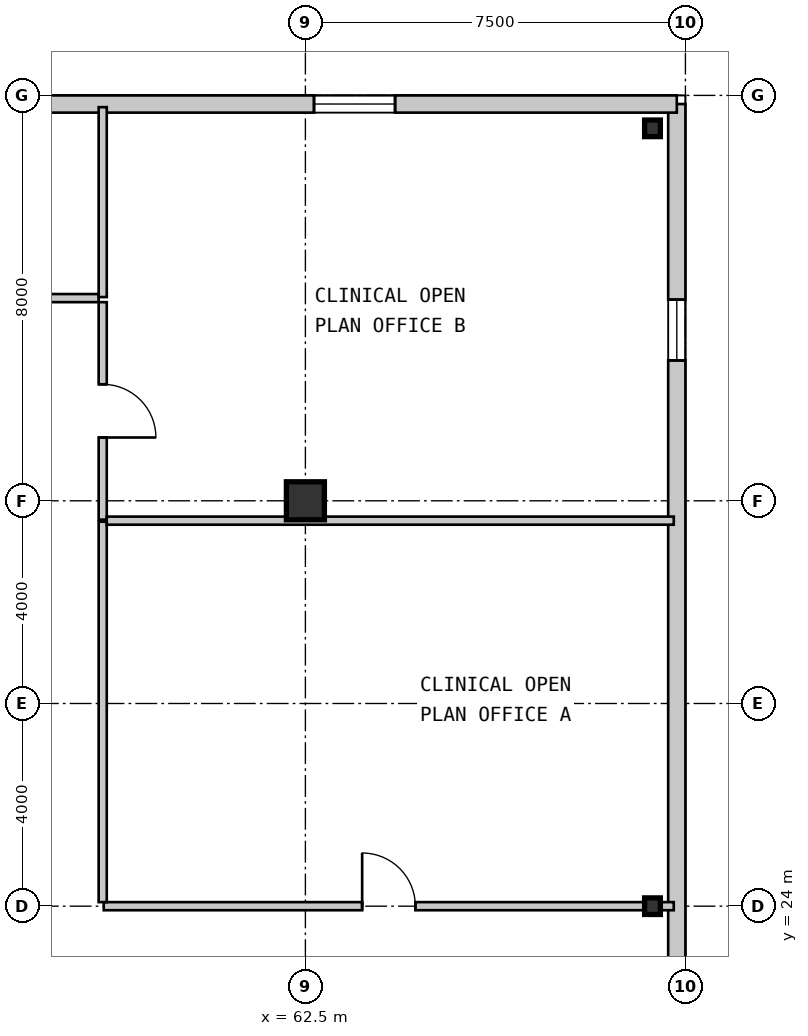
"""IFC4 building model, lengths in metres.
Left out: names, types, materials, properties, quantities, classifications, styles, units other than length and angle.
Written with IfcOpenShell. Run it as: python <this file> out.ifc"""

import sys

from ifc_helpers import new_model, si_unit, direction, frame, frame_2d, origin, origin_2d, place, context, subcontext, project, spatial, rectangle, circle, i_section, extrude, source, transform, mapped, element, fill, save


model = new_model("IFC4")
c1 = context("Model", 3, precision=1e-05, world=origin(), true_north=direction((0.0, 1.0)))
c2 = subcontext(c1, "Body", "Model", "MODEL_VIEW")
j1 = project(units=[si_unit("LENGTHUNIT", "METRE"), si_unit("PLANEANGLEUNIT", "RADIAN")], contexts=[c1])
p1 = place(None, origin())
s1 = spatial("IfcSite", under=j1, at=p1, CompositionType="ELEMENT")
p2 = place(p1, origin())
s2 = spatial("IfcBuilding", under=s1, at=p2, CompositionType="ELEMENT")
p3 = place(p2, frame((0.0, 0.0, 4.55)))
s3 = spatial("IfcBuildingStorey", under=s2, at=p3, CompositionType="ELEMENT", Elevation=4.55)
m1 = source(origin(), c2, "Body", "SweptSolid", [
    extrude(circle(Radius=0.375, at=origin_2d()), origin(), (0.0, 0.0, 1.0), 3.85),
])
p4 = place(p3, frame((62.5, 32.0, 0.0), z_axis=(0.0, 0.0, 1.0), x_axis=(1.0, 0.0, 0.0)))
e1 = element("IfcColumn", 1, at=p4, inside=s3, PredefinedType="COLUMN", context=c2, shape_type="MappedRepresentation", body=[
    mapped(m1, transform((0.0, 0.0, 0.0), scale=1.0)),
])
m2 = source(origin(), c2, "Body", "SweptSolid", [
    extrude(i_section(OverallWidth=0.311, OverallDepth=0.327, WebThickness=0.016, FlangeThickness=0.025, at=origin_2d()), origin(), (0.0, 0.0, 1.0), 3.85),
])
for number, where, z_axis, x_axis in (
    (2, (69.35, 24.0, 0.0), (0.0, 0.0, 1.0), (1.0, 0.0, 0.0)),
    (3, (69.35, 39.35, 0.0), (0.0, 0.0, 1.0), (1.0, 0.0, 0.0)),
):
    element("IfcColumn", number, at=place(p3, frame(where, z_axis=z_axis, x_axis=x_axis)), inside=s3, PredefinedType="COLUMN", context=c2, shape_type="MappedRepresentation", body=[
        mapped(m2, transform((0.0, 0.0, 0.0), scale=1.0)),
    ])
m3 = source(origin(), c2, "Body", "SweptSolid", [
    extrude(rectangle(XDim=39.66, YDim=0.34, at=frame_2d((19.83, 0.0))), origin(), (0.0, 0.0, 1.0), 3.59),
])
p5 = place(p3, frame((69.83, 0.17, 0.0), z_axis=(0.0, 0.0, 1.0), x_axis=(0.0, 1.0, 0.0)))
e4 = element("IfcWall", 4, at=p5, inside=s3, PredefinedType="SOLIDWALL", context=c2, shape_type="MappedRepresentation", body=[
    mapped(m3, transform((0.0, 0.0, 0.0), scale=1.0)),
])
m4 = source(origin(), c2, "Body", "SweptSolid", [
    extrude(rectangle(XDim=2.4, YDim=1.8, at=frame_2d((1.2, 0.9))), frame((0.0, 0.18, 0.0), z_axis=(0.0, -1.0, 0.0), x_axis=(1.0, 0.0, 0.0)), (0.0, 0.0, 1.0), 0.36),
])
p6 = place(p5, frame((3.2, 0.0, 0.95)))
e5 = element("IfcOpeningElement", 5, at=p6, cuts=e4, PredefinedType="OPENING", context=c2, shape_type="MappedRepresentation", body=[
    mapped(m4, transform((0.0, 0.0, 0.0), scale=1.0)),
])
m5 = source(origin(), c2, "Body", "SweptSolid", [
    extrude(rectangle(XDim=1.8, YDim=1.6, at=frame_2d((0.9, 0.8))), frame((0.0, 0.18, 0.0), z_axis=(0.0, -1.0, 0.0), x_axis=(1.0, 0.0, 0.0)), (0.0, 0.0, 1.0), 0.36),
])
p7 = place(p5, frame((7.8, 0.0, 0.95)))
e6 = element("IfcOpeningElement", 6, at=p7, cuts=e4, PredefinedType="OPENING", context=c2, shape_type="MappedRepresentation", body=[
    mapped(m5, transform((0.0, 0.0, 0.0), scale=1.0)),
])
m6 = source(origin(), c2, "Body", "SweptSolid", [
    extrude(rectangle(XDim=1.5, YDim=1.5, at=frame_2d((0.75, 0.75))), frame((0.0, 0.18, 0.0), z_axis=(0.0, -1.0, 0.0), x_axis=(1.0, 0.0, 0.0)), (0.0, 0.0, 1.0), 0.36),
])
p8 = place(p5, frame((21.2, 0.0, 0.95)))
e7 = element("IfcOpeningElement", 7, at=p8, cuts=e4, PredefinedType="OPENING", context=c2, shape_type="MappedRepresentation", body=[
    mapped(m6, transform((0.0, 0.0, 0.0), scale=1.0)),
])
m7 = source(origin(), c2, "Body", "SweptSolid", [
    extrude(rectangle(XDim=1.2, YDim=1.5, at=frame_2d((0.6, 0.75))), frame((0.0, 0.18, 0.0), z_axis=(0.0, -1.0, 0.0), x_axis=(1.0, 0.0, 0.0)), (0.0, 0.0, 1.0), 0.36),
])
p9 = place(p5, frame((34.6, 0.0, 0.95)))
e8 = element("IfcOpeningElement", 8, at=p9, cuts=e4, PredefinedType="OPENING", context=c2, shape_type="MappedRepresentation", body=[
    mapped(m7, transform((0.0, 0.0, 0.0), scale=1.0)),
])
m8 = source(origin(), c2, "Body", "SweptSolid", [
    extrude(rectangle(XDim=69.66, YDim=0.34, at=frame_2d((34.83, 0.0))), origin(), (0.0, 0.0, 1.0), 3.59),
])
p10 = place(p3, frame((0.17, 39.83, 0.0), z_axis=(0.0, 0.0, 1.0), x_axis=(1.0, 0.0, 0.0)))
e9 = element("IfcWall", 9, at=p10, inside=s3, PredefinedType="SOLIDWALL", context=c2, shape_type="MappedRepresentation", body=[
    mapped(m8, transform((0.0, 0.0, 0.0), scale=1.0)),
])
m9 = source(origin(), c2, "Body", "SweptSolid", [
    extrude(rectangle(XDim=1.6, YDim=1.2, at=frame_2d((0.8, 0.6))), frame((0.0, 0.18, 0.0), z_axis=(0.0, -1.0, 0.0), x_axis=(1.0, 0.0, 0.0)), (0.0, 0.0, 1.0), 0.36),
])
p11 = place(p10, frame((4.5, 0.0, 0.95)))
e10 = element("IfcOpeningElement", 10, at=p11, cuts=e9, PredefinedType="OPENING", context=c2, shape_type="MappedRepresentation", body=[
    mapped(m9, transform((0.0, 0.0, 0.0), scale=1.0)),
])
p12 = place(p10, frame((22.5, 0.0, 0.95)))
e11 = element("IfcOpeningElement", 11, at=p12, cuts=e9, PredefinedType="OPENING", context=c2, shape_type="MappedRepresentation", body=[
    mapped(m9, transform((0.0, 0.0, 0.0), scale=1.0)),
])
p13 = place(p10, frame((29.0, 0.0, 0.95)))
e12 = element("IfcOpeningElement", 12, at=p13, cuts=e9, PredefinedType="OPENING", context=c2, shape_type="MappedRepresentation", body=[
    mapped(m9, transform((0.0, 0.0, 0.0), scale=1.0)),
])
p14 = place(p10, frame((40.5, 0.0, 0.95)))
e13 = element("IfcOpeningElement", 13, at=p14, cuts=e9, PredefinedType="OPENING", context=c2, shape_type="MappedRepresentation", body=[
    mapped(m9, transform((0.0, 0.0, 0.0), scale=1.0)),
])
p15 = place(p10, frame((46.5, 0.0, 0.95)))
e14 = element("IfcOpeningElement", 14, at=p15, cuts=e9, PredefinedType="OPENING", context=c2, shape_type="MappedRepresentation", body=[
    mapped(m9, transform((0.0, 0.0, 0.0), scale=1.0)),
])
p16 = place(p10, frame((62.5, 0.0, 0.95)))
e15 = element("IfcOpeningElement", 15, at=p16, cuts=e9, PredefinedType="OPENING", context=c2, shape_type="MappedRepresentation", body=[
    mapped(m9, transform((0.0, 0.0, 0.0), scale=1.0)),
])
m10 = source(origin(), c2, "Body", "SweptSolid", [
    extrude(rectangle(XDim=11.25, YDim=0.16, at=frame_2d((5.625, 0.0))), origin(), (0.0, 0.0, 1.0), 3.59),
])
p17 = place(p3, frame((58.52, 24.0, 0.0), z_axis=(0.0, 0.0, 1.0), x_axis=(1.0, 0.0, 0.0)))
e16 = element("IfcWall", 16, at=p17, inside=s3, PredefinedType="PARTITIONING", context=c2, shape_type="MappedRepresentation", body=[
    mapped(m10, transform((0.0, 0.0, 0.0), scale=1.0)),
])
m11 = source(origin(), c2, "Body", "SweptSolid", [
    extrude(rectangle(XDim=1.05, YDim=2.1, at=frame_2d((0.525, 1.05))), frame((0.0, 0.09, 0.0), z_axis=(0.0, -1.0, 0.0), x_axis=(1.0, 0.0, 0.0)), (0.0, 0.0, 1.0), 0.18),
])
p18 = place(p17, frame((5.1, 0.0, 0.0)))
e17 = element("IfcOpeningElement", 17, at=p18, cuts=e16, PredefinedType="OPENING", context=c2, shape_type="MappedRepresentation", body=[
    mapped(m11, transform((0.0, 0.0, 0.0), scale=1.0)),
])
m12 = source(origin(), c2, "Body", "SweptSolid", [
    extrude(rectangle(XDim=7.508, YDim=0.16, at=frame_2d((3.754, 0.0))), origin(), (0.0, 0.0, 1.0), 3.59),
])
p19 = place(p3, frame((58.5, 31.588, 0.0), z_axis=(0.0, 0.0, 1.0), x_axis=(0.0, -1.0, 0.0)))
e18 = element("IfcWall", 18, at=p19, inside=s3, PredefinedType="PARTITIONING", context=c2, shape_type="MappedRepresentation", body=[
    mapped(m12, transform((0.0, 0.0, 0.0), scale=1.0)),
])
m13 = source(origin(), c2, "Body", "SweptSolid", [
    extrude(rectangle(XDim=4.292, YDim=0.16, at=frame_2d((2.146, 0.0))), origin(), (0.0, 0.0, 1.0), 3.59),
])
p20 = place(p3, frame((58.5, 35.92, 0.0), z_axis=(0.0, 0.0, 1.0), x_axis=(0.0, -1.0, 0.0)))
e19 = element("IfcWall", 19, at=p20, inside=s3, PredefinedType="PARTITIONING", context=c2, shape_type="MappedRepresentation", body=[
    mapped(m13, transform((0.0, 0.0, 0.0), scale=1.0)),
])
p21 = place(p20, frame((1.621, 0.0, 0.0)))
e20 = element("IfcOpeningElement", 20, at=p21, cuts=e19, PredefinedType="OPENING", context=c2, shape_type="MappedRepresentation", body=[
    mapped(m11, transform((0.0, 0.0, 0.0), scale=1.0)),
])
m14 = source(origin(), c2, "Body", "SweptSolid", [
    extrude(rectangle(XDim=2.84, YDim=0.16, at=frame_2d((1.42, 0.0))), origin(), (0.0, 0.0, 1.0), 3.59),
])
p22 = place(p3, frame((55.58, 36.0, 0.0), z_axis=(0.0, 0.0, 1.0), x_axis=(1.0, 0.0, 0.0)))
e21 = element("IfcWall", 21, at=p22, inside=s3, PredefinedType="PARTITIONING", context=c2, shape_type="MappedRepresentation", body=[
    mapped(m14, transform((0.0, 0.0, 0.0), scale=1.0)),
])
m15 = source(origin(), c2, "Body", "SweptSolid", [
    extrude(rectangle(XDim=11.19, YDim=0.16, at=frame_2d((5.595, 0.0))), origin(), (0.0, 0.0, 1.0), 3.59),
])
p23 = place(p3, frame((58.58, 31.608, 0.0), z_axis=(0.0, 0.0, 1.0), x_axis=(1.0, 0.0, 0.0)))
e22 = element("IfcWall", 22, at=p23, inside=s3, PredefinedType="PARTITIONING", context=c2, shape_type="MappedRepresentation", body=[
    mapped(m15, transform((0.0, 0.0, 0.0), scale=1.0)),
])
m16 = source(origin(), c2, "Body", "SweptSolid", [
    extrude(rectangle(XDim=3.748, YDim=0.16, at=frame_2d((1.874, 0.0))), origin(), (0.0, 0.0, 1.0), 3.59),
])
p24 = place(p3, frame((58.5, 36.02, 0.0), z_axis=(0.0, 0.0, 1.0), x_axis=(0.0, 1.0, 0.0)))
e23 = element("IfcWall", 23, at=p24, inside=s3, PredefinedType="PARTITIONING", context=c2, shape_type="MappedRepresentation", body=[
    mapped(m16, transform((0.0, 0.0, 0.0), scale=1.0)),
])
m17 = source(origin(), c2, "Body", "SweptSolid", [
    extrude(rectangle(XDim=1.2, YDim=1.5, at=frame_2d((0.6, 0.75))), frame((0.0, 0.03, 0.0), z_axis=(0.0, -1.0, 0.0), x_axis=(1.0, 0.0, 0.0)), (0.0, 0.0, 1.0), 0.06),
])
p25 = place(p9, origin())
e24 = element("IfcWindow", 24, at=p25, inside=s3, PartitioningType="SINGLE_PANEL", PredefinedType="WINDOW", context=c2, shape_type="MappedRepresentation", body=[
    mapped(m17, transform((0.0, 0.0, 0.0), scale=1.0)),
])
fill(e8, e24)
m18 = source(origin(), c2, "Body", "SweptSolid", [
    extrude(rectangle(XDim=1.6, YDim=1.2, at=frame_2d((0.8, 0.6))), frame((0.0, 0.03, 0.0), z_axis=(0.0, -1.0, 0.0), x_axis=(1.0, 0.0, 0.0)), (0.0, 0.0, 1.0), 0.06),
])
p26 = place(p16, origin())
e25 = element("IfcWindow", 25, at=p26, inside=s3, PartitioningType="SINGLE_PANEL", PredefinedType="WINDOW", context=c2, shape_type="MappedRepresentation", body=[
    mapped(m18, transform((0.0, 0.0, 0.0), scale=1.0)),
])
fill(e15, e25)
m19 = source(origin(), c2, "Body", "SweptSolid", [
    extrude(rectangle(XDim=1.05, YDim=2.1, at=frame_2d((0.525, 1.05))), frame((0.0, 0.025, 0.0), z_axis=(0.0, -1.0, 0.0), x_axis=(1.0, 0.0, 0.0)), (0.0, 0.0, 1.0), 0.05),
])
p27 = place(p18, origin())
e26 = element("IfcDoor", 26, at=p27, inside=s3, OperationType="SINGLE_SWING_LEFT", PredefinedType="DOOR", context=c2, shape_type="MappedRepresentation", body=[
    mapped(m19, transform((0.0, 0.0, 0.0), scale=1.0)),
])
fill(e17, e26)
p28 = place(p21, origin())
e27 = element("IfcDoor", 27, at=p28, inside=s3, OperationType="SINGLE_SWING_RIGHT", PredefinedType="DOOR", context=c2, shape_type="MappedRepresentation", body=[
    mapped(m19, transform((0.0, 0.0, 0.0), scale=1.0)),
])
fill(e20, e27)
save(model, sys.argv[1])
